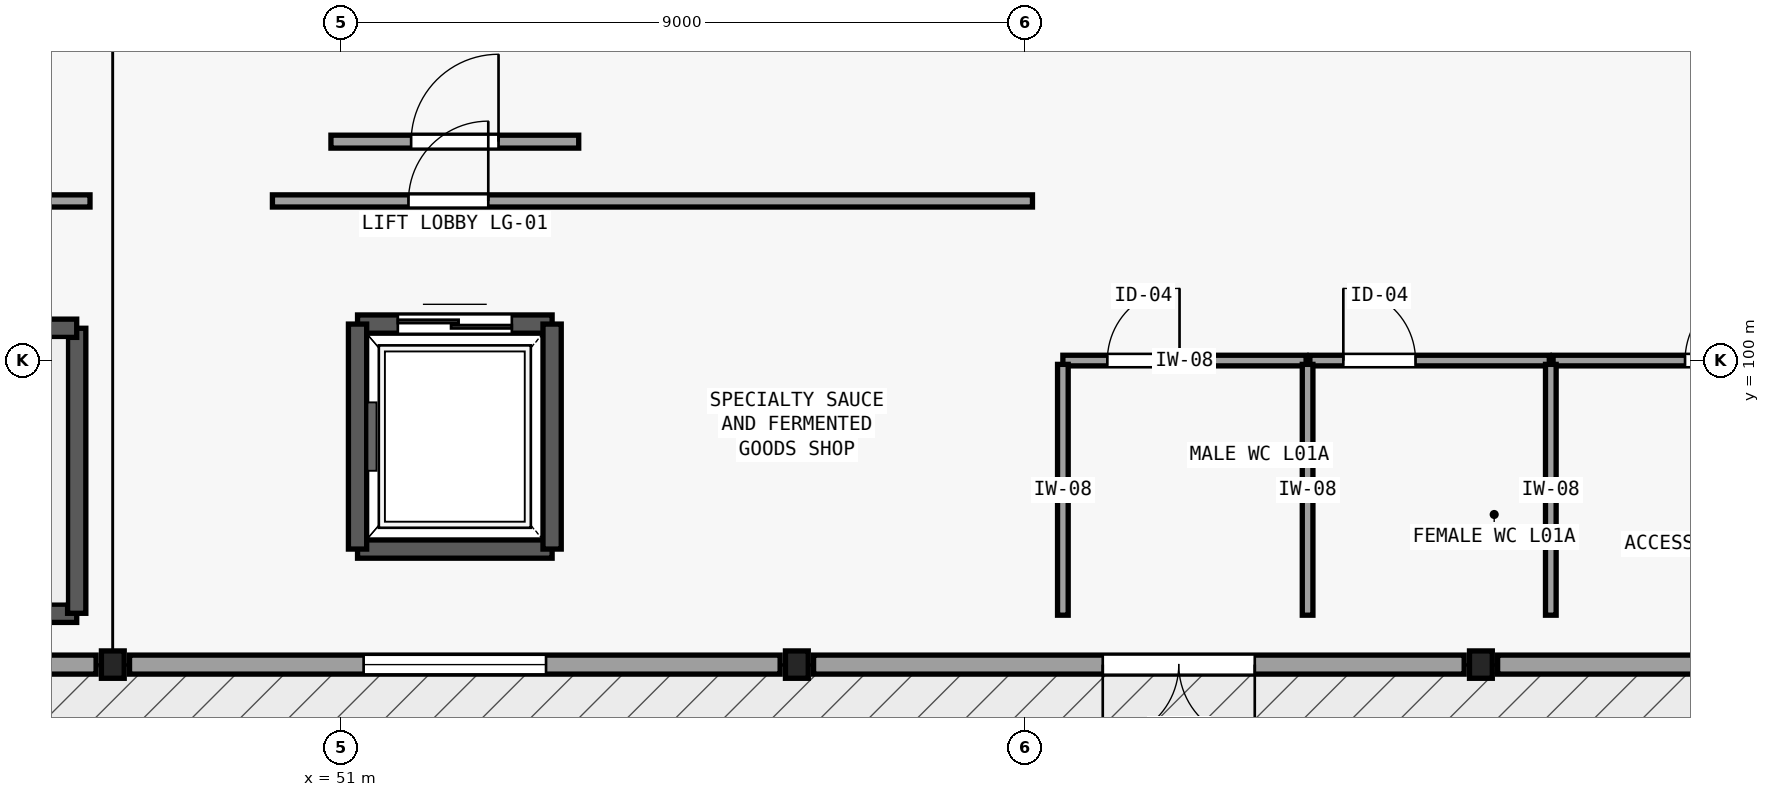
"""IFC4 building model, lengths in metres.
Left out: names, types, materials, properties, quantities, classifications, styles, units other than length and angle.
Written with IfcOpenShell. Run it as: python <this file> out.ifc"""

import sys

from ifc_helpers import new_model, si_unit, direction, frame, frame_2d, origin, origin_2d, place, context, subcontext, project, spatial, rectangle, i_section, extrude, element, fill, save


model = new_model("IFC4")
c1 = context("Model", 3, precision=1e-05, world=origin(), true_north=direction((0.0, 1.0)))
c2 = subcontext(c1, "Body", "Model", "MODEL_VIEW")
j1 = project(units=[si_unit("LENGTHUNIT", "METRE"), si_unit("PLANEANGLEUNIT", "RADIAN")], contexts=[c1])
p1 = place(None, origin())
s1 = spatial("IfcSite", under=j1, at=p1, CompositionType="ELEMENT")
p2 = place(p1, origin())
s2 = spatial("IfcBuilding", under=s1, at=p2, CompositionType="ELEMENT")
p3 = place(p2, origin())
s3 = spatial("IfcBuildingStorey", under=s2, at=p3, CompositionType="ELEMENT", Elevation=0.0)
for number, where, z_axis, x_axis in (
    (1, (48.0, 96.0, 0.0), (0.0, 0.0, 1.0), (1.0, 0.0, 0.0)),
    (2, (57.0, 96.0, 0.0), (0.0, 0.0, 1.0), (1.0, 0.0, 0.0)),
    (3, (66.0, 96.0, 0.0), (0.0, 0.0, 1.0), (1.0, 0.0, 0.0)),
):
    element("IfcColumn", number, at=place(p3, frame(where, z_axis=z_axis, x_axis=x_axis)), inside=s3, PredefinedType="COLUMN", context=c2, shape_type="SweptSolid", body=[
        extrude(i_section(OverallWidth=0.3, OverallDepth=0.36, WebThickness=0.012, FlangeThickness=0.022, FilletRadius=0.027, at=origin_2d()), origin(), (0.0, 0.0, 1.0), 5.4),
    ])
p4 = place(p3, frame((47.78, 96.0, 0.0), z_axis=(0.0, 0.0, 1.0), x_axis=(-1.0, 0.0, 0.0)))
e4 = element("IfcWall", 4, at=p4, inside=s3, PredefinedType="SOLIDWALL", context=c2, shape_type="SweptSolid", body=[
    extrude(rectangle(XDim=8.56, YDim=0.25, at=frame_2d((4.28, 0.0))), origin(), (0.0, 0.0, 1.0), 4.61),
])
p5 = place(p4, frame((3.08, 0.0, 2.1)))
e5 = element("IfcOpeningElement", 5, at=p5, cuts=e4, PredefinedType="OPENING", context=c2, shape_type="SweptSolid", body=[
    extrude(rectangle(XDim=2.4, YDim=1.1, at=frame_2d((1.2, 0.55))), frame((0.0, 0.135, 0.0), z_axis=(0.0, -1.0, 0.0), x_axis=(1.0, 0.0, 0.0)), (0.0, 0.0, 1.0), 0.27),
])
p6 = place(p3, frame((56.78, 96.0, 0.0), z_axis=(0.0, 0.0, 1.0), x_axis=(-1.0, 0.0, 0.0)))
e6 = element("IfcWall", 6, at=p6, inside=s3, PredefinedType="SOLIDWALL", context=c2, shape_type="SweptSolid", body=[
    extrude(rectangle(XDim=8.56, YDim=0.25, at=frame_2d((4.28, 0.0))), origin(), (0.0, 0.0, 1.0), 4.61),
])
p7 = place(p6, frame((3.08, 0.0, 2.1)))
e7 = element("IfcOpeningElement", 7, at=p7, cuts=e6, PredefinedType="OPENING", context=c2, shape_type="SweptSolid", body=[
    extrude(rectangle(XDim=2.4, YDim=1.1, at=frame_2d((1.2, 0.55))), frame((0.0, 0.135, 0.0), z_axis=(0.0, -1.0, 0.0), x_axis=(1.0, 0.0, 0.0)), (0.0, 0.0, 1.0), 0.27),
])
p8 = place(p3, frame((65.78, 96.0, 0.0), z_axis=(0.0, 0.0, 1.0), x_axis=(-1.0, 0.0, 0.0)))
e8 = element("IfcWall", 8, at=p8, inside=s3, PredefinedType="SOLIDWALL", context=c2, shape_type="SweptSolid", body=[
    extrude(rectangle(XDim=8.56, YDim=0.25, at=frame_2d((4.28, 0.0))), origin(), (0.0, 0.0, 1.0), 4.61),
])
p9 = place(p8, frame((2.755, 0.0, 0.0)))
e9 = element("IfcOpeningElement", 9, at=p9, cuts=e8, PredefinedType="OPENING", context=c2, shape_type="SweptSolid", body=[
    extrude(rectangle(XDim=2.0, YDim=2.3, at=frame_2d((1.0, 1.15))), frame((0.0, 0.135, 0.0), z_axis=(0.0, -1.0, 0.0), x_axis=(1.0, 0.0, 0.0)), (0.0, 0.0, 1.0), 0.27),
])
p10 = place(p3, frame((74.78, 96.0, 0.0), z_axis=(0.0, 0.0, 1.0), x_axis=(-1.0, 0.0, 0.0)))
e10 = element("IfcWall", 10, at=p10, inside=s3, PredefinedType="SOLIDWALL", context=c2, shape_type="SweptSolid", body=[
    extrude(rectangle(XDim=8.56, YDim=0.25, at=frame_2d((4.28, 0.0))), origin(), (0.0, 0.0, 1.0), 4.61),
])
p11 = place(p10, frame((2.755, 0.0, 0.0)))
e11 = element("IfcOpeningElement", 11, at=p11, cuts=e10, PredefinedType="OPENING", context=c2, shape_type="SweptSolid", body=[
    extrude(rectangle(XDim=2.0, YDim=2.3, at=frame_2d((1.0, 1.15))), frame((0.0, 0.135, 0.0), z_axis=(0.0, -1.0, 0.0), x_axis=(1.0, 0.0, 0.0)), (0.0, 0.0, 1.0), 0.27),
])
p12 = place(p3, frame((47.525, 96.675, 0.0), z_axis=(0.0, 0.0, 1.0), x_axis=(-1.0, 0.0, 0.0)))
e12 = element("IfcWall", 12, at=p12, inside=s3, PredefinedType="SOLIDWALL", context=c2, shape_type="SweptSolid", body=[
    extrude(rectangle(XDim=8.0, YDim=0.24, at=frame_2d((4.0, 0.0))), origin(), (0.0, 0.0, 1.0), 5.11),
])
p13 = place(p3, frame((47.525, 100.425, 0.0), z_axis=(0.0, 0.0, 1.0), x_axis=(0.0, -1.0, 0.0)))
e13 = element("IfcWall", 13, at=p13, inside=s3, PredefinedType="SOLIDWALL", context=c2, shape_type="SweptSolid", body=[
    extrude(rectangle(XDim=3.75, YDim=0.24, at=frame_2d((1.875, 0.0))), origin(), (0.0, 0.0, 1.0), 5.11),
])
p14 = place(p3, frame((39.525, 100.425, 0.0), z_axis=(0.0, 0.0, 1.0), x_axis=(1.0, 0.0, 0.0)))
e14 = element("IfcWall", 14, at=p14, inside=s3, PredefinedType="SOLIDWALL", context=c2, shape_type="SweptSolid", body=[
    extrude(rectangle(XDim=8.0, YDim=0.24, at=frame_2d((4.0, 0.0))), origin(), (0.0, 0.0, 1.0), 5.11),
])
p15 = place(p3, frame((53.78, 97.52, 0.0), z_axis=(0.0, 0.0, 1.0), x_axis=(-1.0, 0.0, 0.0)))
e15 = element("IfcWall", 15, at=p15, inside=s3, PredefinedType="SOLIDWALL", context=c2, shape_type="SweptSolid", body=[
    extrude(rectangle(XDim=2.56, YDim=0.24, at=frame_2d((1.28, 0.0))), origin(), (0.0, 0.0, 1.0), 5.08),
])
p16 = place(p3, frame((51.22, 100.48, 0.0), z_axis=(0.0, 0.0, 1.0), x_axis=(1.0, 0.0, 0.0)))
e16 = element("IfcWall", 16, at=p16, inside=s3, PredefinedType="SOLIDWALL", context=c2, shape_type="SweptSolid", body=[
    extrude(rectangle(XDim=2.56, YDim=0.24, at=frame_2d((1.28, 0.0))), origin(), (0.0, 0.0, 1.0), 5.08),
])
p17 = place(p16, frame((0.53, 0.0, 0.0)))
e17 = element("IfcOpeningElement", 17, at=p17, cuts=e16, PredefinedType="OPENING", context=c2, shape_type="SweptSolid", body=[
    extrude(rectangle(XDim=1.5, YDim=2.25, at=frame_2d((0.75, 1.125))), frame((0.0, 0.13, 0.0), z_axis=(0.0, -1.0, 0.0), x_axis=(1.0, 0.0, 0.0)), (0.0, 0.0, 1.0), 0.26),
])
for number, where, z_axis, x_axis in (
    (18, (51.22, 97.52, 0.0), (0.0, 0.0, 1.0), (0.0, 1.0, 0.0)),
    (19, (53.78, 100.48, 0.0), (0.0, 0.0, 1.0), (0.0, -1.0, 0.0)),
):
    element("IfcWall", number, at=place(p3, frame(where, z_axis=z_axis, x_axis=x_axis)), inside=s3, PredefinedType="SOLIDWALL", context=c2, shape_type="SweptSolid", body=[
        extrude(rectangle(XDim=2.96, YDim=0.24, at=frame_2d((1.48, 0.0))), origin(), (0.0, 0.0, 1.0), 5.08),
    ])
p18 = place(p3, frame((50.87, 102.88, 0.0), z_axis=(0.0, 0.0, 1.0), x_axis=(1.0, 0.0, 0.0)))
e20 = element("IfcWall", 20, at=p18, inside=s3, PredefinedType="PARTITIONING", context=c2, shape_type="SweptSolid", body=[
    extrude(rectangle(XDim=3.26, YDim=0.17, at=frame_2d((1.63, 0.0))), origin(), (0.0, 0.0, 1.0), 5.08),
])
p19 = place(p18, frame((1.055, 0.0, 0.0)))
e21 = element("IfcOpeningElement", 21, at=p19, cuts=e20, PredefinedType="OPENING", context=c2, shape_type="SweptSolid", body=[
    extrude(rectangle(XDim=1.15, YDim=2.15, at=frame_2d((0.575, 1.075))), frame((0.0, 0.095, 0.0), z_axis=(0.0, -1.0, 0.0), x_axis=(1.0, 0.0, 0.0)), (0.0, 0.0, 1.0), 0.19),
])
p20 = place(p3, frame((60.5, 100.0, 0.0), z_axis=(0.0, 0.0, 1.0), x_axis=(1.0, 0.0, 0.0)))
e22 = element("IfcWall", 22, at=p20, inside=s3, PredefinedType="PARTITIONING", context=c2, shape_type="SweptSolid", body=[
    extrude(rectangle(XDim=3.2, YDim=0.14, at=frame_2d((1.6, 0.0))), origin(), (0.0, 0.0, 1.0), 5.08),
])
p21 = place(p20, frame((0.585, 0.0, 0.0)))
e23 = element("IfcOpeningElement", 23, at=p21, cuts=e22, PredefinedType="OPENING", context=c2, shape_type="SweptSolid", body=[
    extrude(rectangle(XDim=0.95, YDim=2.1, at=frame_2d((0.475, 1.05))), frame((0.0, 0.08, 0.0), z_axis=(0.0, -1.0, 0.0), x_axis=(1.0, 0.0, 0.0)), (0.0, 0.0, 1.0), 0.16),
])
p22 = place(p3, frame((63.75, 100.0, 0.0), z_axis=(0.0, 0.0, 1.0), x_axis=(1.0, 0.0, 0.0)))
e24 = element("IfcWall", 24, at=p22, inside=s3, PredefinedType="PARTITIONING", context=c2, shape_type="SweptSolid", body=[
    extrude(rectangle(XDim=3.15, YDim=0.14, at=frame_2d((1.575, 0.0))), origin(), (0.0, 0.0, 1.0), 4.71),
])
p23 = place(p22, frame((0.44, 0.0, 0.0)))
e25 = element("IfcOpeningElement", 25, at=p23, cuts=e24, PredefinedType="OPENING", context=c2, shape_type="SweptSolid", body=[
    extrude(rectangle(XDim=0.95, YDim=2.1, at=frame_2d((0.475, 1.05))), frame((0.0, 0.08, 0.0), z_axis=(0.0, -1.0, 0.0), x_axis=(1.0, 0.0, 0.0)), (0.0, 0.0, 1.0), 0.16),
])
p24 = place(p3, frame((66.95, 100.0, 0.0), z_axis=(0.0, 0.0, 1.0), x_axis=(1.0, 0.0, 0.0)))
e26 = element("IfcWall", 26, at=p24, inside=s3, PredefinedType="PARTITIONING", context=c2, shape_type="SweptSolid", body=[
    extrude(rectangle(XDim=3.15, YDim=0.14, at=frame_2d((1.575, 0.0))), origin(), (0.0, 0.0, 1.0), 5.08),
])
p25 = place(p24, frame((1.736, 0.0, 0.0)))
e27 = element("IfcOpeningElement", 27, at=p25, cuts=e26, PredefinedType="OPENING", context=c2, shape_type="SweptSolid", body=[
    extrude(rectangle(XDim=0.98, YDim=2.15, at=frame_2d((0.49, 1.075))), frame((0.0, 0.08, 0.0), z_axis=(0.0, -1.0, 0.0), x_axis=(1.0, 0.0, 0.0)), (0.0, 0.0, 1.0), 0.16),
])
for number, where, z_axis, x_axis in (
    (28, (63.72, 96.65, 0.0), (0.0, 0.0, 1.0), (0.0, 1.0, 0.0)),
    (29, (66.92, 96.65, 0.0), (0.0, 0.0, 1.0), (0.0, 1.0, 0.0)),
    (30, (60.5, 96.65, 0.0), (0.0, 0.0, 1.0), (0.0, 1.0, 0.0)),
):
    element("IfcWall", number, at=place(p3, frame(where, z_axis=z_axis, x_axis=x_axis)), inside=s3, PredefinedType="PARTITIONING", context=c2, shape_type="SweptSolid", body=[
        extrude(rectangle(XDim=3.3, YDim=0.14, at=frame_2d((1.65, 0.0))), origin(), (0.0, 0.0, 1.0), 5.08),
    ])
p26 = place(p3, frame((12.5, 102.1, 0.0), z_axis=(0.0, 0.0, 1.0), x_axis=(1.0, 0.0, 0.0)))
e31 = element("IfcWall", 31, at=p26, inside=s3, PredefinedType="PARTITIONING", context=c2, shape_type="SweptSolid", body=[
    extrude(rectangle(XDim=35.2, YDim=0.16, at=frame_2d((17.6, 0.0))), origin(), (0.0, 0.0, 1.0), 4.71),
])
p27 = place(p26, frame((11.611, 0.0, 0.0)))
e32 = element("IfcOpeningElement", 32, at=p27, cuts=e31, PredefinedType="OPENING", context=c2, shape_type="SweptSolid", body=[
    extrude(rectangle(XDim=1.05, YDim=2.15, at=frame_2d((0.525, 1.075))), frame((0.0, 0.09, 0.0), z_axis=(0.0, -1.0, 0.0), x_axis=(1.0, 0.0, 0.0)), (0.0, 0.0, 1.0), 0.18),
])
p28 = place(p3, frame((50.1, 102.1, 0.0), z_axis=(0.0, 0.0, 1.0), x_axis=(1.0, 0.0, 0.0)))
e33 = element("IfcWall", 33, at=p28, inside=s3, PredefinedType="PARTITIONING", context=c2, shape_type="SweptSolid", body=[
    extrude(rectangle(XDim=10.0, YDim=0.16, at=frame_2d((5.0, 0.0))), origin(), (0.0, 0.0, 1.0), 4.71),
])
p29 = place(p28, frame((1.79, 0.0, 0.0)))
e34 = element("IfcOpeningElement", 34, at=p29, cuts=e33, PredefinedType="OPENING", context=c2, shape_type="SweptSolid", body=[
    extrude(rectangle(XDim=1.05, YDim=2.15, at=frame_2d((0.525, 1.075))), frame((0.0, 0.09, 0.0), z_axis=(0.0, -1.0, 0.0), x_axis=(1.0, 0.0, 0.0)), (0.0, 0.0, 1.0), 0.18),
])
p30 = place(p7, origin())
e35 = element("IfcWindow", 35, at=p30, inside=s3, PartitioningType="SINGLE_PANEL", PredefinedType="WINDOW", context=c2, shape_type="SweptSolid", body=[
    extrude(rectangle(XDim=2.4, YDim=1.1, at=frame_2d((1.2, 0.55))), frame((0.0, 0.03, 0.0), z_axis=(0.0, -1.0, 0.0), x_axis=(1.0, 0.0, 0.0)), (0.0, 0.0, 1.0), 0.06),
])
fill(e7, e35)
p31 = place(p9, origin())
e36 = element("IfcDoor", 36, at=p31, inside=s3, OperationType="DOUBLE_DOOR_SINGLE_SWING", PredefinedType="DOOR", context=c2, shape_type="SweptSolid", body=[
    extrude(rectangle(XDim=2.0, YDim=2.3, at=frame_2d((1.0, 1.15))), frame((0.0, 0.025, 0.0), z_axis=(0.0, -1.0, 0.0), x_axis=(1.0, 0.0, 0.0)), (0.0, 0.0, 1.0), 0.05),
])
fill(e9, e36)
p32 = place(p17, origin())
e37 = element("IfcDoor", 37, at=p32, inside=s3, OperationType="DOUBLE_DOOR_SLIDING", PredefinedType="DOOR", context=c2, shape_type="SweptSolid", body=[
    extrude(rectangle(XDim=1.5, YDim=2.25, at=frame_2d((0.75, 1.125))), frame((0.0, 0.025, 0.0), z_axis=(0.0, -1.0, 0.0), x_axis=(1.0, 0.0, 0.0)), (0.0, 0.0, 1.0), 0.05),
])
fill(e17, e37)
p33 = place(p19, origin())
e38 = element("IfcDoor", 38, at=p33, inside=s3, OperationType="SINGLE_SWING_RIGHT", PredefinedType="DOOR", context=c2, shape_type="SweptSolid", body=[
    extrude(rectangle(XDim=1.15, YDim=2.15, at=frame_2d((0.575, 1.075))), frame((0.0, 0.025, 0.0), z_axis=(0.0, -1.0, 0.0), x_axis=(1.0, 0.0, 0.0)), (0.0, 0.0, 1.0), 0.05),
])
fill(e21, e38)
p34 = place(p21, origin())
e39 = element("IfcDoor", 39, at=p34, inside=s3, OperationType="SINGLE_SWING_RIGHT", PredefinedType="DOOR", context=c2, shape_type="SweptSolid", body=[
    extrude(rectangle(XDim=0.95, YDim=2.1, at=frame_2d((0.475, 1.05))), frame((0.0, 0.025, 0.0), z_axis=(0.0, -1.0, 0.0), x_axis=(1.0, 0.0, 0.0)), (0.0, 0.0, 1.0), 0.05),
])
fill(e23, e39)
p35 = place(p23, origin())
e40 = element("IfcDoor", 40, at=p35, inside=s3, OperationType="SINGLE_SWING_LEFT", PredefinedType="DOOR", context=c2, shape_type="SweptSolid", body=[
    extrude(rectangle(XDim=0.95, YDim=2.1, at=frame_2d((0.475, 1.05))), frame((0.0, 0.025, 0.0), z_axis=(0.0, -1.0, 0.0), x_axis=(1.0, 0.0, 0.0)), (0.0, 0.0, 1.0), 0.05),
])
fill(e25, e40)
p36 = place(p25, origin())
e41 = element("IfcDoor", 41, at=p36, inside=s3, OperationType="SINGLE_SWING_RIGHT", PredefinedType="DOOR", context=c2, shape_type="SweptSolid", body=[
    extrude(rectangle(XDim=0.98, YDim=2.15, at=frame_2d((0.49, 1.075))), frame((0.0, 0.025, 0.0), z_axis=(0.0, -1.0, 0.0), x_axis=(1.0, 0.0, 0.0)), (0.0, 0.0, 1.0), 0.05),
])
fill(e27, e41)
p37 = place(p29, origin())
e42 = element("IfcDoor", 42, at=p37, inside=s3, OperationType="SINGLE_SWING_RIGHT", PredefinedType="DOOR", context=c2, shape_type="SweptSolid", body=[
    extrude(rectangle(XDim=1.05, YDim=2.15, at=frame_2d((0.525, 1.075))), frame((0.0, 0.025, 0.0), z_axis=(0.0, -1.0, 0.0), x_axis=(1.0, 0.0, 0.0)), (0.0, 0.0, 1.0), 0.05),
])
fill(e34, e42)
save(model, sys.argv[1])
